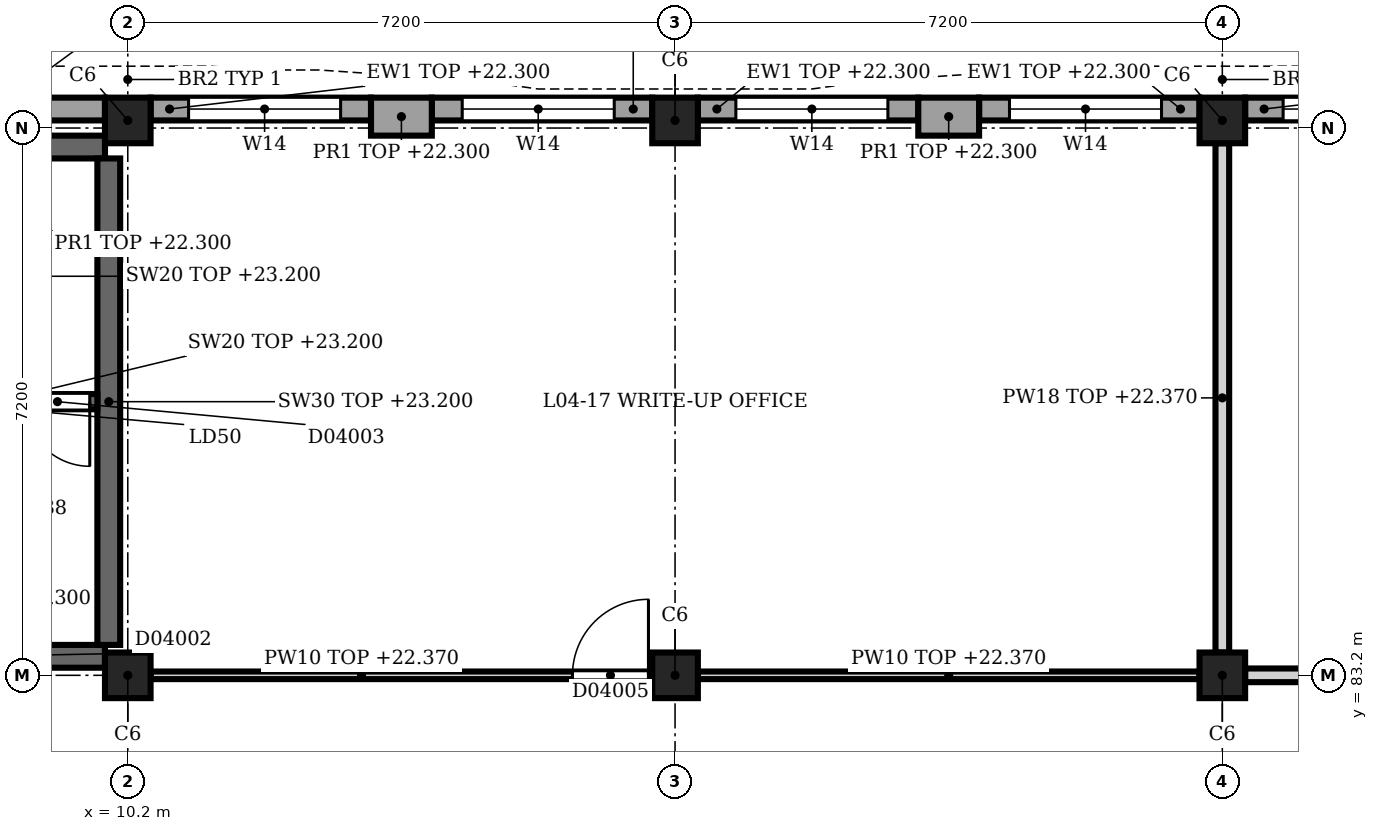
"""IFC4 building model, lengths in metres.
Left out: names, types, materials, properties, quantities, classifications, styles, units other than length and angle.
Written with IfcOpenShell. Run it as: python <this file> out.ifc"""

import sys

from ifc_helpers import new_model, si_unit, direction, frame, frame_2d, origin, origin_2d, place, context, subcontext, project, spatial, rectangle, extrude, element, fill, save


model = new_model("IFC4")
c1 = context("Model", 3, precision=1e-05, world=origin(), true_north=direction((0.0, 1.0)))
c2 = subcontext(c1, "Body", "Model", "MODEL_VIEW")
j1 = project(units=[si_unit("LENGTHUNIT", "METRE"), si_unit("PLANEANGLEUNIT", "RADIAN")], contexts=[c1])
p1 = place(None, origin())
s1 = spatial("IfcSite", under=j1, at=p1, CompositionType="ELEMENT")
p2 = place(p1, origin())
s2 = spatial("IfcBuilding", under=s1, at=p2, CompositionType="ELEMENT")
p3 = place(p2, frame((0.0, 0.0, 18.9)))
s3 = spatial("IfcBuildingStorey", under=s2, at=p3, CompositionType="ELEMENT", Elevation=18.9)
for number, where, z_axis, x_axis in (
    (1, (10.2, 83.2, 0.0), (0.0, 0.0, 1.0), (1.0, 0.0, 0.0)),
    (2, (10.2, 90.5, 0.0), (0.0, 0.0, 1.0), (1.0, 0.0, 0.0)),
    (3, (17.4, 83.2, 0.0), (0.0, 0.0, 1.0), (1.0, 0.0, 0.0)),
    (4, (17.4, 90.5, 0.0), (0.0, 0.0, 1.0), (1.0, 0.0, 0.0)),
    (5, (24.6, 83.2, 0.0), (0.0, 0.0, 1.0), (1.0, 0.0, 0.0)),
    (6, (24.6, 90.5, 0.0), (0.0, 0.0, 1.0), (1.0, 0.0, 0.0)),
):
    element("IfcColumn", number, at=place(p3, frame(where, z_axis=z_axis, x_axis=x_axis)), inside=s3, PredefinedType="COLUMN", context=c2, shape_type="SweptSolid", body=[
        extrude(rectangle(XDim=0.6, YDim=0.6, at=origin_2d()), origin(), (0.0, 0.0, 1.0), 4.5),
    ])
p4 = place(p3, frame((13.4, 90.55, 0.0), z_axis=(0.0, 0.0, 1.0), x_axis=(1.0, 0.0, 0.0)))
e7 = element("IfcWall", 7, at=p4, inside=s3, PredefinedType="SOLIDWALL", context=c2, shape_type="SweptSolid", body=[
    extrude(rectangle(XDim=0.8, YDim=0.5, at=frame_2d((0.4, 0.0))), origin(), (0.0, 0.0, 1.0), 3.4),
])
p5 = place(p3, frame((20.6, 90.55, 0.0), z_axis=(0.0, 0.0, 1.0), x_axis=(1.0, 0.0, 0.0)))
e8 = element("IfcWall", 8, at=p5, inside=s3, PredefinedType="SOLIDWALL", context=c2, shape_type="SweptSolid", body=[
    extrude(rectangle(XDim=0.8, YDim=0.5, at=frame_2d((0.4, 0.0))), origin(), (0.0, 0.0, 1.0), 3.4),
])
p6 = place(p3, frame((7.0, 90.65, 0.0), z_axis=(0.0, 0.0, 1.0), x_axis=(1.0, 0.0, 0.0)))
e9 = element("IfcWall", 9, at=p6, inside=s3, PredefinedType="SOLIDWALL", context=c2, shape_type="SweptSolid", body=[
    extrude(rectangle(XDim=2.9, YDim=0.3, at=frame_2d((1.45, 0.0))), origin(), (0.0, 0.0, 1.0), 3.4),
])
p7 = place(p3, frame((10.5, 90.65, 0.0), z_axis=(0.0, 0.0, 1.0), x_axis=(1.0, 0.0, 0.0)))
e10 = element("IfcWall", 10, at=p7, inside=s3, PredefinedType="SOLIDWALL", context=c2, shape_type="SweptSolid", body=[
    extrude(rectangle(XDim=2.9, YDim=0.3, at=frame_2d((1.45, 0.0))), origin(), (0.0, 0.0, 1.0), 3.4),
])
p8 = place(p7, frame((0.5, 0.0, 0.9)))
e11 = element("IfcOpeningElement", 11, at=p8, cuts=e10, PredefinedType="OPENING", context=c2, shape_type="SweptSolid", body=[
    extrude(rectangle(XDim=2.0, YDim=2.4, at=frame_2d((1.0, 1.2))), frame((0.0, 0.16, 0.0), z_axis=(0.0, -1.0, 0.0), x_axis=(1.0, 0.0, 0.0)), (0.0, 0.0, 1.0), 0.32),
])
p9 = place(p3, frame((14.2, 90.65, 0.0), z_axis=(0.0, 0.0, 1.0), x_axis=(1.0, 0.0, 0.0)))
e12 = element("IfcWall", 12, at=p9, inside=s3, PredefinedType="SOLIDWALL", context=c2, shape_type="SweptSolid", body=[
    extrude(rectangle(XDim=2.9, YDim=0.3, at=frame_2d((1.45, 0.0))), origin(), (0.0, 0.0, 1.0), 3.4),
])
p10 = place(p9, frame((0.4, 0.0, 0.9)))
e13 = element("IfcOpeningElement", 13, at=p10, cuts=e12, PredefinedType="OPENING", context=c2, shape_type="SweptSolid", body=[
    extrude(rectangle(XDim=2.0, YDim=2.4, at=frame_2d((1.0, 1.2))), frame((0.0, 0.16, 0.0), z_axis=(0.0, -1.0, 0.0), x_axis=(1.0, 0.0, 0.0)), (0.0, 0.0, 1.0), 0.32),
])
p11 = place(p3, frame((17.7, 90.65, 0.0), z_axis=(0.0, 0.0, 1.0), x_axis=(1.0, 0.0, 0.0)))
e14 = element("IfcWall", 14, at=p11, inside=s3, PredefinedType="SOLIDWALL", context=c2, shape_type="SweptSolid", body=[
    extrude(rectangle(XDim=2.9, YDim=0.3, at=frame_2d((1.45, 0.0))), origin(), (0.0, 0.0, 1.0), 3.4),
])
p12 = place(p11, frame((0.5, 0.0, 0.9)))
e15 = element("IfcOpeningElement", 15, at=p12, cuts=e14, PredefinedType="OPENING", context=c2, shape_type="SweptSolid", body=[
    extrude(rectangle(XDim=2.0, YDim=2.4, at=frame_2d((1.0, 1.2))), frame((0.0, 0.16, 0.0), z_axis=(0.0, -1.0, 0.0), x_axis=(1.0, 0.0, 0.0)), (0.0, 0.0, 1.0), 0.32),
])
p13 = place(p3, frame((21.4, 90.65, 0.0), z_axis=(0.0, 0.0, 1.0), x_axis=(1.0, 0.0, 0.0)))
e16 = element("IfcWall", 16, at=p13, inside=s3, PredefinedType="SOLIDWALL", context=c2, shape_type="SweptSolid", body=[
    extrude(rectangle(XDim=2.9, YDim=0.3, at=frame_2d((1.45, 0.0))), origin(), (0.0, 0.0, 1.0), 3.4),
])
p14 = place(p13, frame((0.4, 0.0, 0.9)))
e17 = element("IfcOpeningElement", 17, at=p14, cuts=e16, PredefinedType="OPENING", context=c2, shape_type="SweptSolid", body=[
    extrude(rectangle(XDim=2.0, YDim=2.4, at=frame_2d((1.0, 1.2))), frame((0.0, 0.16, 0.0), z_axis=(0.0, -1.0, 0.0), x_axis=(1.0, 0.0, 0.0)), (0.0, 0.0, 1.0), 0.32),
])
p15 = place(p3, frame((24.9, 90.65, 0.0), z_axis=(0.0, 0.0, 1.0), x_axis=(1.0, 0.0, 0.0)))
e18 = element("IfcWall", 18, at=p15, inside=s3, PredefinedType="SOLIDWALL", context=c2, shape_type="SweptSolid", body=[
    extrude(rectangle(XDim=2.9, YDim=0.3, at=frame_2d((1.45, 0.0))), origin(), (0.0, 0.0, 1.0), 3.4),
])
p16 = place(p15, frame((0.5, 0.0, 0.9)))
e19 = element("IfcOpeningElement", 19, at=p16, cuts=e18, PredefinedType="OPENING", context=c2, shape_type="SweptSolid", body=[
    extrude(rectangle(XDim=2.0, YDim=2.4, at=frame_2d((1.0, 1.2))), frame((0.0, 0.16, 0.0), z_axis=(0.0, -1.0, 0.0), x_axis=(1.0, 0.0, 0.0)), (0.0, 0.0, 1.0), 0.32),
])
p17 = place(p3, frame((3.2, 83.45, 0.0), z_axis=(0.0, 0.0, 1.0), x_axis=(1.0, 0.0, 0.0)))
e20 = element("IfcWall", 20, at=p17, inside=s3, PredefinedType="SHEAR", context=c2, shape_type="SweptSolid", body=[
    extrude(rectangle(XDim=6.7, YDim=0.3, at=frame_2d((3.35, 0.0))), origin(), (0.0, 0.0, 1.0), 4.3),
])
p18 = place(p17, frame((4.4, 0.0, 0.0)))
e21 = element("IfcOpeningElement", 21, at=p18, cuts=e20, PredefinedType="OPENING", context=c2, shape_type="SweptSolid", body=[
    extrude(rectangle(XDim=1.2, YDim=2.1, at=frame_2d((0.6, 1.05))), frame((0.0, 0.16, 0.0), z_axis=(0.0, -1.0, 0.0), x_axis=(1.0, 0.0, 0.0)), (0.0, 0.0, 1.0), 0.32),
])
p19 = place(p3, frame((3.2, 90.15, 0.0), z_axis=(0.0, 0.0, 1.0), x_axis=(1.0, 0.0, 0.0)))
e22 = element("IfcWall", 22, at=p19, inside=s3, PredefinedType="SHEAR", context=c2, shape_type="SweptSolid", body=[
    extrude(rectangle(XDim=6.7, YDim=0.3, at=frame_2d((3.35, 0.0))), origin(), (0.0, 0.0, 1.0), 4.3),
])
p20 = place(p19, frame((1.3, 0.0, 1.2)))
e23 = element("IfcOpeningElement", 23, at=p20, cuts=e22, PredefinedType="OPENING", context=c2, shape_type="SweptSolid", body=[
    extrude(rectangle(XDim=0.6, YDim=1.8, at=frame_2d((0.3, 0.9))), frame((0.0, 0.16, 0.0), z_axis=(0.0, -1.0, 0.0), x_axis=(1.0, 0.0, 0.0)), (0.0, 0.0, 1.0), 0.32),
])
p21 = place(p3, frame((9.95, 83.6, 0.0), z_axis=(0.0, 0.0, 1.0), x_axis=(0.0, 1.0, 0.0)))
e24 = element("IfcWall", 24, at=p21, inside=s3, PredefinedType="SHEAR", context=c2, shape_type="SweptSolid", body=[
    extrude(rectangle(XDim=6.4, YDim=0.3, at=frame_2d((3.2, 0.0))), origin(), (0.0, 0.0, 1.0), 4.3),
])
p22 = place(p3, frame((9.8, 86.8, 0.0), z_axis=(0.0, 0.0, 1.0), x_axis=(-1.0, 0.0, 0.0)))
e25 = element("IfcWall", 25, at=p22, inside=s3, PredefinedType="SHEAR", context=c2, shape_type="SweptSolid", body=[
    extrude(rectangle(XDim=3.25, YDim=0.2, at=frame_2d((1.625, 0.0))), origin(), (0.0, 0.0, 1.0), 4.3),
])
p23 = place(p22, frame((1.7, 0.0, 0.0)))
e26 = element("IfcOpeningElement", 26, at=p23, cuts=e25, PredefinedType="OPENING", context=c2, shape_type="SweptSolid", body=[
    extrude(rectangle(XDim=1.1, YDim=2.1, at=frame_2d((0.55, 1.05))), frame((0.0, 0.11, 0.0), z_axis=(0.0, -1.0, 0.0), x_axis=(1.0, 0.0, 0.0)), (0.0, 0.0, 1.0), 0.22),
])
p24 = place(p22, frame((0.1, 0.0, 0.0)))
e27 = element("IfcOpeningElement", 27, at=p24, cuts=e25, PredefinedType="OPENING", context=c2, shape_type="SweptSolid", body=[
    extrude(rectangle(XDim=0.85, YDim=2.1, at=frame_2d((0.425, 1.05))), frame((0.0, 0.11, 0.0), z_axis=(0.0, -1.0, 0.0), x_axis=(1.0, 0.0, 0.0)), (0.0, 0.0, 1.0), 0.22),
])
p25 = place(p3, frame((10.5, 83.2, 0.0), z_axis=(0.0, 0.0, 1.0), x_axis=(1.0, 0.0, 0.0)))
e28 = element("IfcWall", 28, at=p25, inside=s3, PredefinedType="PARTITIONING", context=c2, shape_type="SweptSolid", body=[
    extrude(rectangle(XDim=6.6, YDim=0.1, at=frame_2d((3.3, 0.0))), origin(), (0.0, 0.0, 1.0), 3.47),
])
p26 = place(p25, frame((5.55, 0.0, 0.0)))
e29 = element("IfcOpeningElement", 29, at=p26, cuts=e28, PredefinedType="OPENING", context=c2, shape_type="SweptSolid", body=[
    extrude(rectangle(XDim=1.0, YDim=2.1, at=frame_2d((0.5, 1.05))), frame((0.0, 0.06, 0.0), z_axis=(0.0, -1.0, 0.0), x_axis=(1.0, 0.0, 0.0)), (0.0, 0.0, 1.0), 0.12),
])
p27 = place(p3, frame((17.7, 83.2, 0.0), z_axis=(0.0, 0.0, 1.0), x_axis=(1.0, 0.0, 0.0)))
e30 = element("IfcWall", 30, at=p27, inside=s3, PredefinedType="PARTITIONING", context=c2, shape_type="SweptSolid", body=[
    extrude(rectangle(XDim=6.6, YDim=0.1, at=frame_2d((3.3, 0.0))), origin(), (0.0, 0.0, 1.0), 3.47),
])
p28 = place(p3, frame((24.9, 83.2, 0.0), z_axis=(0.0, 0.0, 1.0), x_axis=(1.0, 0.0, 0.0)))
e31 = element("IfcWall", 31, at=p28, inside=s3, PredefinedType="PARTITIONING", context=c2, shape_type="SweptSolid", body=[
    extrude(rectangle(XDim=6.6, YDim=0.18, at=frame_2d((3.3, 0.0))), origin(), (0.0, 0.0, 1.0), 3.47),
])
p29 = place(p28, frame((4.55, 0.0, 0.0)))
e32 = element("IfcOpeningElement", 32, at=p29, cuts=e31, PredefinedType="OPENING", context=c2, shape_type="SweptSolid", body=[
    extrude(rectangle(XDim=1.1, YDim=2.3, at=frame_2d((0.55, 1.15))), frame((0.0, 0.1, 0.0), z_axis=(0.0, -1.0, 0.0), x_axis=(1.0, 0.0, 0.0)), (0.0, 0.0, 1.0), 0.2),
])
p30 = place(p3, frame((24.6, 83.5, 0.0), z_axis=(0.0, 0.0, 1.0), x_axis=(0.0, 1.0, 0.0)))
e33 = element("IfcWall", 33, at=p30, inside=s3, PredefinedType="PARTITIONING", context=c2, shape_type="SweptSolid", body=[
    extrude(rectangle(XDim=6.7, YDim=0.18, at=frame_2d((3.35, 0.0))), origin(), (0.0, 0.0, 1.0), 3.47),
])
p31 = place(p8, origin())
e34 = element("IfcWindow", 34, at=p31, inside=s3, PartitioningType="SINGLE_PANEL", PredefinedType="WINDOW", context=c2, shape_type="SweptSolid", body=[
    extrude(rectangle(XDim=2.0, YDim=2.4, at=frame_2d((1.0, 1.2))), frame((0.0, 0.03, 0.0), z_axis=(0.0, -1.0, 0.0), x_axis=(1.0, 0.0, 0.0)), (0.0, 0.0, 1.0), 0.06),
])
fill(e11, e34)
p32 = place(p10, origin())
e35 = element("IfcWindow", 35, at=p32, inside=s3, PartitioningType="SINGLE_PANEL", PredefinedType="WINDOW", context=c2, shape_type="SweptSolid", body=[
    extrude(rectangle(XDim=2.0, YDim=2.4, at=frame_2d((1.0, 1.2))), frame((0.0, 0.03, 0.0), z_axis=(0.0, -1.0, 0.0), x_axis=(1.0, 0.0, 0.0)), (0.0, 0.0, 1.0), 0.06),
])
fill(e13, e35)
p33 = place(p12, origin())
e36 = element("IfcWindow", 36, at=p33, inside=s3, PartitioningType="SINGLE_PANEL", PredefinedType="WINDOW", context=c2, shape_type="SweptSolid", body=[
    extrude(rectangle(XDim=2.0, YDim=2.4, at=frame_2d((1.0, 1.2))), frame((0.0, 0.03, 0.0), z_axis=(0.0, -1.0, 0.0), x_axis=(1.0, 0.0, 0.0)), (0.0, 0.0, 1.0), 0.06),
])
fill(e15, e36)
p34 = place(p14, origin())
e37 = element("IfcWindow", 37, at=p34, inside=s3, PartitioningType="SINGLE_PANEL", PredefinedType="WINDOW", context=c2, shape_type="SweptSolid", body=[
    extrude(rectangle(XDim=2.0, YDim=2.4, at=frame_2d((1.0, 1.2))), frame((0.0, 0.03, 0.0), z_axis=(0.0, -1.0, 0.0), x_axis=(1.0, 0.0, 0.0)), (0.0, 0.0, 1.0), 0.06),
])
fill(e17, e37)
p35 = place(p16, origin())
e38 = element("IfcWindow", 38, at=p35, inside=s3, PartitioningType="SINGLE_PANEL", PredefinedType="WINDOW", context=c2, shape_type="SweptSolid", body=[
    extrude(rectangle(XDim=2.0, YDim=2.4, at=frame_2d((1.0, 1.2))), frame((0.0, 0.03, 0.0), z_axis=(0.0, -1.0, 0.0), x_axis=(1.0, 0.0, 0.0)), (0.0, 0.0, 1.0), 0.06),
])
fill(e19, e38)
p36 = place(p24, origin())
e39 = element("IfcDoor", 39, at=p36, inside=s3, OperationType="SINGLE_SWING_LEFT", PredefinedType="DOOR", context=c2, shape_type="SweptSolid", body=[
    extrude(rectangle(XDim=0.85, YDim=2.1, at=frame_2d((0.425, 1.05))), frame((0.0, 0.025, 0.0), z_axis=(0.0, -1.0, 0.0), x_axis=(1.0, 0.0, 0.0)), (0.0, 0.0, 1.0), 0.05),
])
fill(e27, e39)
p37 = place(p26, origin())
e40 = element("IfcDoor", 40, at=p37, inside=s3, OperationType="SINGLE_SWING_RIGHT", PredefinedType="DOOR", context=c2, shape_type="SweptSolid", body=[
    extrude(rectangle(XDim=1.0, YDim=2.1, at=frame_2d((0.5, 1.05))), frame((0.0, 0.025, 0.0), z_axis=(0.0, -1.0, 0.0), x_axis=(1.0, 0.0, 0.0)), (0.0, 0.0, 1.0), 0.05),
])
fill(e29, e40)
save(model, sys.argv[1])
